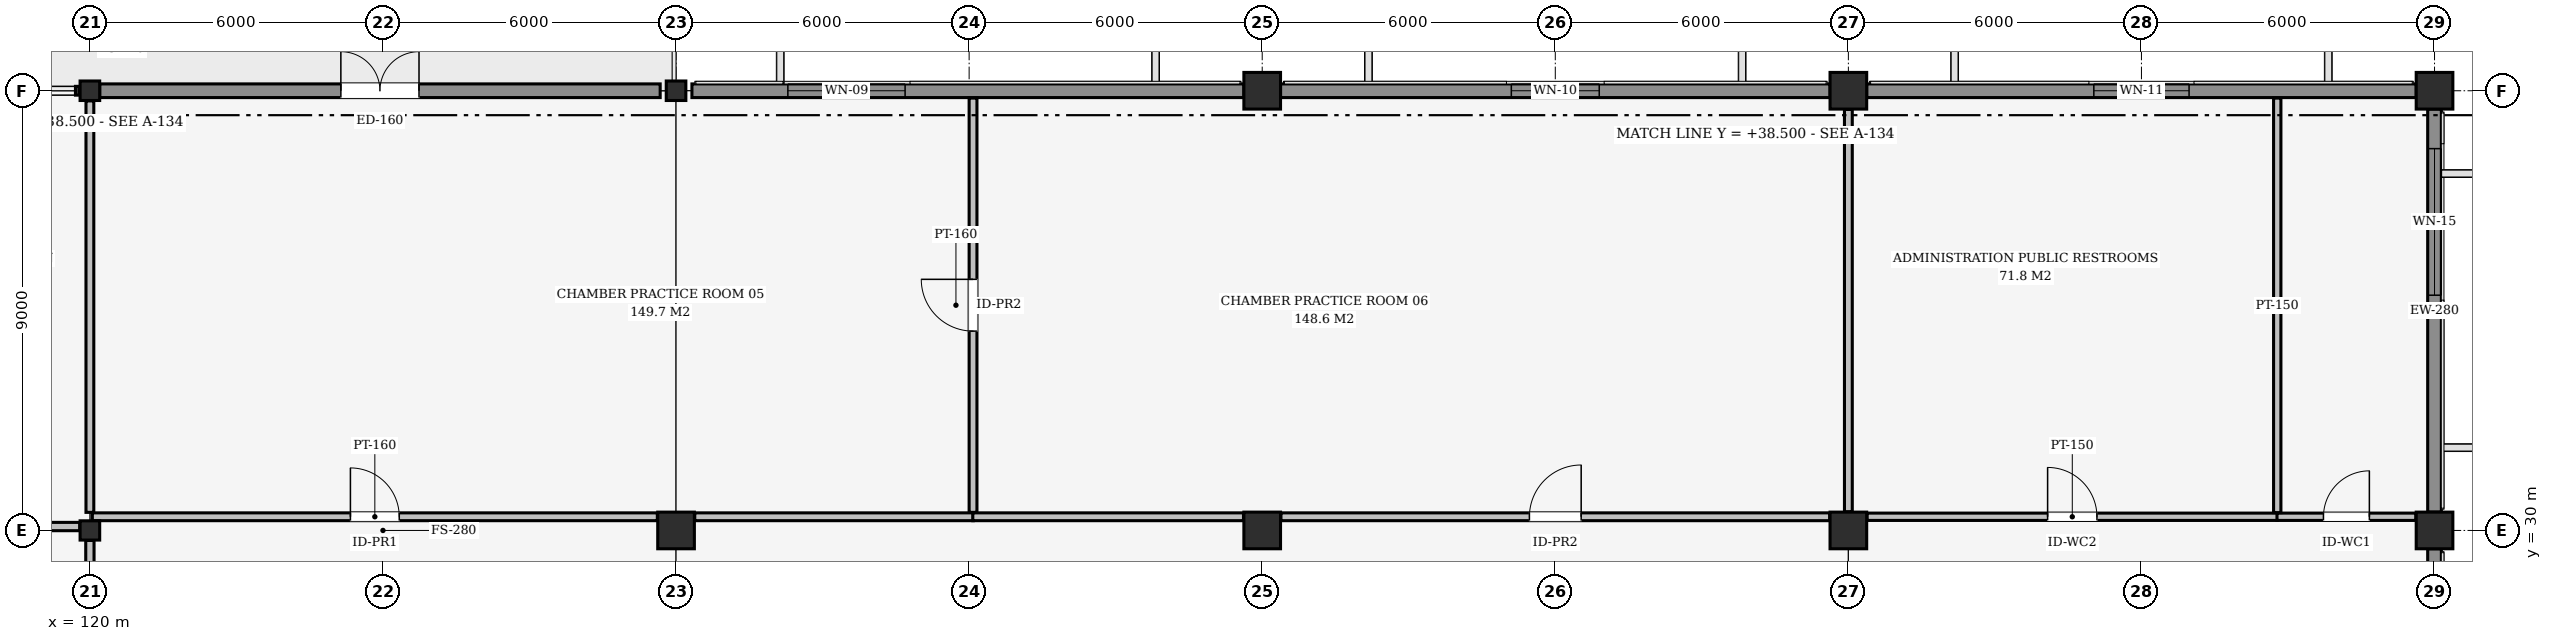
"""IFC4 building model, lengths in metres.
Left out: names, types, materials, properties, quantities, classifications, styles, units other than length and angle.
Written with IfcOpenShell. Run it as: python <this file> out.ifc"""

import sys

from ifc_helpers import new_model, si_unit, direction, frame, frame_2d, origin, origin_2d, place, context, subcontext, project, spatial, rectangle, i_section, extrude, element, fill, save


model = new_model("IFC4")
c1 = context("Model", 3, precision=1e-05, world=origin(), true_north=direction((0.0, 1.0)))
c2 = subcontext(c1, "Body", "Model", "MODEL_VIEW")
j1 = project(units=[si_unit("LENGTHUNIT", "METRE"), si_unit("PLANEANGLEUNIT", "RADIAN")], contexts=[c1])
p1 = place(None, origin())
s1 = spatial("IfcSite", under=j1, at=p1, CompositionType="ELEMENT")
p2 = place(p1, origin())
s2 = spatial("IfcBuilding", under=s1, at=p2, CompositionType="ELEMENT")
p3 = place(p2, frame((0.0, 0.0, 9.3)))
s3 = spatial("IfcBuildingStorey", under=s2, at=p3, CompositionType="ELEMENT", Elevation=9.3)
p4 = place(p3, frame((120.0, 30.0, 0.0), z_axis=(0.0, 0.0, 1.0), x_axis=(1.0, 0.0, 0.0)))
e1 = element("IfcColumn", 1, at=p4, inside=s3, PredefinedType="COLUMN", context=c2, shape_type="SweptSolid", body=[
    extrude(i_section(OverallWidth=0.401, OverallDepth=0.394, WebThickness=0.023, FlangeThickness=0.037, at=origin_2d()), origin(), (0.0, 0.0, 1.0), 4.5),
])
p5 = place(p3, frame((120.0, 39.0, 0.0), z_axis=(0.0, 0.0, 1.0), x_axis=(1.0, 0.0, 0.0)))
e2 = element("IfcColumn", 2, at=p5, inside=s3, PredefinedType="COLUMN", context=c2, shape_type="SweptSolid", body=[
    extrude(i_section(OverallWidth=0.401, OverallDepth=0.399, WebThickness=0.025, FlangeThickness=0.04, at=origin_2d()), origin(), (0.0, 0.0, 1.0), 4.5),
])
p6 = place(p3, frame((132.0, 30.0, 0.0), z_axis=(0.0, 0.0, 1.0), x_axis=(1.0, 0.0, 0.0)))
e3 = element("IfcColumn", 3, at=p6, inside=s3, PredefinedType="COLUMN", context=c2, shape_type="SweptSolid", body=[
    extrude(rectangle(XDim=0.75, YDim=0.75, at=origin_2d()), origin(), (0.0, 0.0, 1.0), 4.5),
])
p7 = place(p3, frame((132.0, 39.0, 0.0), z_axis=(0.0, 0.0, 1.0), x_axis=(1.0, 0.0, 0.0)))
e4 = element("IfcColumn", 4, at=p7, inside=s3, PredefinedType="COLUMN", context=c2, shape_type="SweptSolid", body=[
    extrude(i_section(OverallWidth=0.401, OverallDepth=0.399, WebThickness=0.025, FlangeThickness=0.04, at=origin_2d()), origin(), (0.0, 0.0, 1.0), 4.5),
])
for number, where, z_axis, x_axis in (
    (5, (144.0, 30.0, 0.0), (0.0, 0.0, 1.0), (1.0, 0.0, 0.0)),
    (6, (144.0, 39.0, 0.0), (0.0, 0.0, 1.0), (1.0, 0.0, 0.0)),
    (7, (156.0, 30.0, 0.0), (0.0, 0.0, 1.0), (1.0, 0.0, 0.0)),
    (8, (156.0, 39.0, 0.0), (0.0, 0.0, 1.0), (1.0, 0.0, 0.0)),
    (9, (168.0, 30.0, 0.0), (0.0, 0.0, 1.0), (1.0, 0.0, 0.0)),
    (10, (168.0, 39.0, 0.0), (0.0, 0.0, 1.0), (1.0, 0.0, 0.0)),
):
    element("IfcColumn", number, at=place(p3, frame(where, z_axis=z_axis, x_axis=x_axis)), inside=s3, PredefinedType="COLUMN", context=c2, shape_type="SweptSolid", body=[
        extrude(rectangle(XDim=0.75, YDim=0.75, at=origin_2d()), origin(), (0.0, 0.0, 1.0), 4.5),
    ])
p8 = place(p3, frame((120.2, 39.0, 0.0), z_axis=(0.0, 0.0, 1.0), x_axis=(1.0, 0.0, 0.0)))
e11 = element("IfcWall", 11, at=p8, inside=s3, PredefinedType="SOLIDWALL", context=c2, shape_type="SweptSolid", body=[
    extrude(rectangle(XDim=11.475, YDim=0.28, at=frame_2d((5.737, 0.0))), origin(), (0.0, 0.0, 1.0), 3.388),
])
p9 = place(p8, frame((4.937, 0.0, 0.0)))
e12 = element("IfcOpeningElement", 12, at=p9, cuts=e11, PredefinedType="OPENING", context=c2, shape_type="SweptSolid", body=[
    extrude(rectangle(XDim=1.6, YDim=2.3, at=frame_2d((0.8, 1.15))), frame((0.0, 0.15, 0.0), z_axis=(0.0, -1.0, 0.0), x_axis=(1.0, 0.0, 0.0)), (0.0, 0.0, 1.0), 0.3),
])
p10 = place(p3, frame((132.325, 39.0, 0.0), z_axis=(0.0, 0.0, 1.0), x_axis=(1.0, 0.0, 0.0)))
e13 = element("IfcWall", 13, at=p10, inside=s3, PredefinedType="SOLIDWALL", context=c2, shape_type="SweptSolid", body=[
    extrude(rectangle(XDim=11.3, YDim=0.28, at=frame_2d((5.65, 0.0))), origin(), (0.0, 0.0, 1.0), 3.549),
])
p11 = place(p10, frame((1.964, 0.0, 0.85)))
e14 = element("IfcOpeningElement", 14, at=p11, cuts=e13, PredefinedType="OPENING", context=c2, shape_type="SweptSolid", body=[
    extrude(rectangle(XDim=2.4, YDim=0.95, at=frame_2d((1.2, 0.475))), frame((0.0, 0.15, 0.0), z_axis=(0.0, -1.0, 0.0), x_axis=(1.0, 0.0, 0.0)), (0.0, 0.0, 1.0), 0.3),
])
p12 = place(p3, frame((144.375, 39.0, 0.0), z_axis=(0.0, 0.0, 1.0), x_axis=(1.0, 0.0, 0.0)))
e15 = element("IfcWall", 15, at=p12, inside=s3, PredefinedType="SOLIDWALL", context=c2, shape_type="SweptSolid", body=[
    extrude(rectangle(XDim=11.25, YDim=0.28, at=frame_2d((5.625, 0.0))), origin(), (0.0, 0.0, 1.0), 3.549),
])
p13 = place(p12, frame((4.725, 0.0, 0.85)))
e16 = element("IfcOpeningElement", 16, at=p13, cuts=e15, PredefinedType="OPENING", context=c2, shape_type="SweptSolid", body=[
    extrude(rectangle(XDim=1.8, YDim=0.95, at=frame_2d((0.9, 0.475))), frame((0.0, 0.15, 0.0), z_axis=(0.0, -1.0, 0.0), x_axis=(1.0, 0.0, 0.0)), (0.0, 0.0, 1.0), 0.3),
])
p14 = place(p3, frame((156.375, 39.0, 0.0), z_axis=(0.0, 0.0, 1.0), x_axis=(1.0, 0.0, 0.0)))
e17 = element("IfcWall", 17, at=p14, inside=s3, PredefinedType="SOLIDWALL", context=c2, shape_type="SweptSolid", body=[
    extrude(rectangle(XDim=11.25, YDim=0.28, at=frame_2d((5.625, 0.0))), origin(), (0.0, 0.0, 1.0), 3.549),
])
p15 = place(p14, frame((4.65, 0.0, 0.85)))
e18 = element("IfcOpeningElement", 18, at=p15, cuts=e17, PredefinedType="OPENING", context=c2, shape_type="SweptSolid", body=[
    extrude(rectangle(XDim=1.95, YDim=1.75, at=frame_2d((0.975, 0.875))), frame((0.0, 0.15, 0.0), z_axis=(0.0, -1.0, 0.0), x_axis=(1.0, 0.0, 0.0)), (0.0, 0.0, 1.0), 0.3),
])
p16 = place(p3, frame((168.0, 29.625, 0.0), z_axis=(0.0, 0.0, 1.0), x_axis=(0.0, -1.0, 0.0)))
e19 = element("IfcWall", 19, at=p16, inside=s3, PredefinedType="SOLIDWALL", context=c2, shape_type="SweptSolid", body=[
    extrude(rectangle(XDim=5.25, YDim=0.28, at=frame_2d((2.625, 0.0))), origin(), (0.0, 0.0, 1.0), 3.548),
])
p17 = place(p16, frame((2.075, 0.0, 0.6)))
e20 = element("IfcOpeningElement", 20, at=p17, cuts=e19, PredefinedType="OPENING", context=c2, shape_type="SweptSolid", body=[
    extrude(rectangle(XDim=1.1, YDim=2.4, at=frame_2d((0.55, 1.2))), frame((0.0, 0.15, 0.0), z_axis=(0.0, -1.0, 0.0), x_axis=(1.0, 0.0, 0.0)), (0.0, 0.0, 1.0), 0.3),
])
p18 = place(p3, frame((168.0, 38.625, 0.0), z_axis=(0.0, 0.0, 1.0), x_axis=(0.0, -1.0, 0.0)))
e21 = element("IfcWall", 21, at=p18, inside=s3, PredefinedType="SOLIDWALL", context=c2, shape_type="SweptSolid", body=[
    extrude(rectangle(XDim=8.25, YDim=0.28, at=frame_2d((4.125, 0.0))), origin(), (0.0, 0.0, 1.0), 3.549),
])
p19 = place(p18, frame((0.81, 0.0, 0.6)))
e22 = element("IfcOpeningElement", 22, at=p19, cuts=e21, PredefinedType="OPENING", context=c2, shape_type="SweptSolid", body=[
    extrude(rectangle(XDim=3.0, YDim=2.1, at=frame_2d((1.5, 1.05))), frame((0.0, 0.15, 0.0), z_axis=(0.0, -1.0, 0.0), x_axis=(1.0, 0.0, 0.0)), (0.0, 0.0, 1.0), 0.3),
])
p20 = place(p3, frame((120.05, 30.28, 0.0), z_axis=(0.0, 0.0, 1.0), x_axis=(1.0, 0.0, 0.0)))
e23 = element("IfcWall", 23, at=p20, inside=s3, PredefinedType="PARTITIONING", context=c2, shape_type="SweptSolid", body=[
    extrude(rectangle(XDim=11.567, YDim=0.16, at=frame_2d((5.783, 0.0))), origin(), (0.0, 0.0, 1.0), 3.388),
])
p21 = place(p20, frame((5.283, 0.0, 0.0)))
e24 = element("IfcOpeningElement", 24, at=p21, cuts=e23, PredefinedType="OPENING", context=c2, shape_type="SweptSolid", body=[
    extrude(rectangle(XDim=1.0, YDim=2.16, at=frame_2d((0.5, 1.08))), frame((0.0, 0.09, 0.0), z_axis=(0.0, -1.0, 0.0), x_axis=(1.0, 0.0, 0.0)), (0.0, 0.0, 1.0), 0.18),
])
p22 = place(p3, frame((132.383, 30.28, 0.0), z_axis=(0.0, 0.0, 1.0), x_axis=(1.0, 0.0, 0.0)))
e25 = element("IfcWall", 25, at=p22, inside=s3, PredefinedType="PARTITIONING", context=c2, shape_type="SweptSolid", body=[
    extrude(rectangle(XDim=5.702, YDim=0.16, at=frame_2d((2.851, 0.0))), origin(), (0.0, 0.0, 1.0), 3.549),
])
p23 = place(p3, frame((138.075, 30.28, 0.0), z_axis=(0.0, 0.0, 1.0), x_axis=(1.0, 0.0, 0.0)))
e26 = element("IfcWall", 26, at=p23, inside=s3, PredefinedType="PARTITIONING", context=c2, shape_type="SweptSolid", body=[
    extrude(rectangle(XDim=5.542, YDim=0.16, at=frame_2d((2.771, 0.0))), origin(), (0.0, 0.0, 1.0), 3.549),
])
p24 = place(p3, frame((144.383, 30.28, 0.0), z_axis=(0.0, 0.0, 1.0), x_axis=(1.0, 0.0, 0.0)))
e27 = element("IfcWall", 27, at=p24, inside=s3, PredefinedType="PARTITIONING", context=c2, shape_type="SweptSolid", body=[
    extrude(rectangle(XDim=11.234, YDim=0.16, at=frame_2d((5.617, 0.0))), origin(), (0.0, 0.0, 1.0), 3.549),
])
p25 = place(p24, frame((5.087, 0.0, 0.0)))
e28 = element("IfcOpeningElement", 28, at=p25, cuts=e27, PredefinedType="OPENING", context=c2, shape_type="SweptSolid", body=[
    extrude(rectangle(XDim=1.06, YDim=2.22, at=frame_2d((0.53, 1.11))), frame((0.0, 0.09, 0.0), z_axis=(0.0, -1.0, 0.0), x_axis=(1.0, 0.0, 0.0)), (0.0, 0.0, 1.0), 0.18),
])
p26 = place(p3, frame((156.383, 30.28, 0.0), z_axis=(0.0, 0.0, 1.0), x_axis=(1.0, 0.0, 0.0)))
e29 = element("IfcWall", 29, at=p26, inside=s3, PredefinedType="PARTITIONING", context=c2, shape_type="SweptSolid", body=[
    extrude(rectangle(XDim=8.402, YDim=0.15, at=frame_2d((4.201, 0.0))), origin(), (0.0, 0.0, 1.0), 3.549),
])
p27 = place(p26, frame((3.696, 0.0, 0.0)))
e30 = element("IfcOpeningElement", 30, at=p27, cuts=e29, PredefinedType="OPENING", context=c2, shape_type="SweptSolid", body=[
    extrude(rectangle(XDim=1.01, YDim=2.1, at=frame_2d((0.505, 1.05))), frame((0.0, 0.085, 0.0), z_axis=(0.0, -1.0, 0.0), x_axis=(1.0, 0.0, 0.0)), (0.0, 0.0, 1.0), 0.17),
])
p28 = place(p3, frame((164.775, 30.28, 0.0), z_axis=(0.0, 0.0, 1.0), x_axis=(1.0, 0.0, 0.0)))
e31 = element("IfcWall", 31, at=p28, inside=s3, PredefinedType="PARTITIONING", context=c2, shape_type="SweptSolid", body=[
    extrude(rectangle(XDim=2.842, YDim=0.15, at=frame_2d((1.421, 0.0))), origin(), (0.0, 0.0, 1.0), 3.549),
])
p29 = place(p28, frame((0.951, 0.0, 0.0)))
e32 = element("IfcOpeningElement", 32, at=p29, cuts=e31, PredefinedType="OPENING", context=c2, shape_type="SweptSolid", body=[
    extrude(rectangle(XDim=0.94, YDim=2.1, at=frame_2d((0.47, 1.05))), frame((0.0, 0.085, 0.0), z_axis=(0.0, -1.0, 0.0), x_axis=(1.0, 0.0, 0.0)), (0.0, 0.0, 1.0), 0.17),
])
p30 = place(p3, frame((120.0, 24.205, 0.0), z_axis=(0.0, 0.0, 1.0), x_axis=(0.0, 1.0, 0.0)))
e33 = element("IfcWall", 33, at=p30, inside=s3, PredefinedType="PARTITIONING", context=c2, shape_type="SweptSolid", body=[
    extrude(rectangle(XDim=5.59, YDim=0.17, at=frame_2d((2.795, 0.0))), origin(), (0.0, 0.0, 1.0), 3.764),
])
p31 = place(p30, frame((2.185, 0.0, 0.0)))
e34 = element("IfcOpeningElement", 34, at=p31, cuts=e33, PredefinedType="OPENING", context=c2, shape_type="SweptSolid", body=[
    extrude(rectangle(XDim=1.22, YDim=2.18, at=frame_2d((0.61, 1.09))), frame((0.0, 0.095, 0.0), z_axis=(0.0, -1.0, 0.0), x_axis=(1.0, 0.0, 0.0)), (0.0, 0.0, 1.0), 0.19),
])
p32 = place(p3, frame((138.08, 30.37, 0.0), z_axis=(0.0, 0.0, 1.0), x_axis=(0.0, 1.0, 0.0)))
e35 = element("IfcWall", 35, at=p32, inside=s3, PredefinedType="PARTITIONING", context=c2, shape_type="SweptSolid", body=[
    extrude(rectangle(XDim=8.48, YDim=0.16, at=frame_2d((4.24, 0.0))), origin(), (0.0, 0.0, 1.0), 3.703),
])
p33 = place(p32, frame((3.71, 0.0, 0.0)))
e36 = element("IfcOpeningElement", 36, at=p33, cuts=e35, PredefinedType="OPENING", context=c2, shape_type="SweptSolid", body=[
    extrude(rectangle(XDim=1.06, YDim=2.22, at=frame_2d((0.53, 1.11))), frame((0.0, 0.09, 0.0), z_axis=(0.0, -1.0, 0.0), x_axis=(1.0, 0.0, 0.0)), (0.0, 0.0, 1.0), 0.18),
])
p34 = place(p3, frame((120.0, 30.37, 0.0), z_axis=(0.0, 0.0, 1.0), x_axis=(0.0, 1.0, 0.0)))
e37 = element("IfcWall", 37, at=p34, inside=s3, PredefinedType="PARTITIONING", context=c2, shape_type="SweptSolid", body=[
    extrude(rectangle(XDim=8.422, YDim=0.16, at=frame_2d((4.211, 0.0))), origin(), (0.0, 0.0, 1.0), 3.764),
])
p35 = place(p3, frame((156.0, 30.383, 0.0), z_axis=(0.0, 0.0, 1.0), x_axis=(0.0, 1.0, 0.0)))
e38 = element("IfcWall", 38, at=p35, inside=s3, PredefinedType="PARTITIONING", context=c2, shape_type="SweptSolid", body=[
    extrude(rectangle(XDim=8.234, YDim=0.16, at=frame_2d((4.117, 0.0))), origin(), (0.0, 0.0, 1.0), 3.549),
])
p36 = place(p3, frame((164.78, 30.365, 0.0), z_axis=(0.0, 0.0, 1.0), x_axis=(0.0, 1.0, 0.0)))
e39 = element("IfcWall", 39, at=p36, inside=s3, PredefinedType="PARTITIONING", context=c2, shape_type="SweptSolid", body=[
    extrude(rectangle(XDim=8.485, YDim=0.15, at=frame_2d((4.243, 0.0))), origin(), (0.0, 0.0, 1.0), 3.703),
])
p37 = place(p3, frame((108.206, 30.08, 0.0), z_axis=(0.0, 0.0, 1.0), x_axis=(1.0, 0.0, 0.0)))
e40 = element("IfcWall", 40, at=p37, inside=s3, PredefinedType="PARTITIONING", context=c2, shape_type="SweptSolid", body=[
    extrude(rectangle(XDim=11.585, YDim=0.17, at=frame_2d((5.793, 0.0))), origin(), (0.0, 0.0, 1.0), 3.739),
])
p38 = place(p37, frame((5.113, 0.0, 0.0)))
e41 = element("IfcOpeningElement", 41, at=p38, cuts=e40, PredefinedType="OPENING", context=c2, shape_type="SweptSolid", body=[
    extrude(rectangle(XDim=1.36, YDim=2.2, at=frame_2d((0.68, 1.1))), frame((0.0, 0.095, 0.0), z_axis=(0.0, -1.0, 0.0), x_axis=(1.0, 0.0, 0.0)), (0.0, 0.0, 1.0), 0.19),
])
p39 = place(p9, origin())
e42 = element("IfcDoor", 42, at=p39, inside=s3, OperationType="DOUBLE_DOOR_SINGLE_SWING", PredefinedType="DOOR", context=c2, shape_type="SweptSolid", body=[
    extrude(rectangle(XDim=1.6, YDim=2.3, at=frame_2d((0.8, 1.15))), frame((0.0, 0.025, 0.0), z_axis=(0.0, -1.0, 0.0), x_axis=(1.0, 0.0, 0.0)), (0.0, 0.0, 1.0), 0.05),
])
fill(e12, e42)
p40 = place(p11, origin())
e43 = element("IfcWindow", 43, at=p40, inside=s3, PartitioningType="SINGLE_PANEL", PredefinedType="WINDOW", context=c2, shape_type="SweptSolid", body=[
    extrude(rectangle(XDim=2.4, YDim=0.95, at=frame_2d((1.2, 0.475))), frame((0.0, 0.03, 0.0), z_axis=(0.0, -1.0, 0.0), x_axis=(1.0, 0.0, 0.0)), (0.0, 0.0, 1.0), 0.06),
])
fill(e14, e43)
p41 = place(p13, origin())
e44 = element("IfcWindow", 44, at=p41, inside=s3, PartitioningType="SINGLE_PANEL", PredefinedType="WINDOW", context=c2, shape_type="SweptSolid", body=[
    extrude(rectangle(XDim=1.8, YDim=0.95, at=frame_2d((0.9, 0.475))), frame((0.0, 0.03, 0.0), z_axis=(0.0, -1.0, 0.0), x_axis=(1.0, 0.0, 0.0)), (0.0, 0.0, 1.0), 0.06),
])
fill(e16, e44)
p42 = place(p15, origin())
e45 = element("IfcWindow", 45, at=p42, inside=s3, PartitioningType="SINGLE_PANEL", PredefinedType="WINDOW", context=c2, shape_type="SweptSolid", body=[
    extrude(rectangle(XDim=1.95, YDim=1.75, at=frame_2d((0.975, 0.875))), frame((0.0, 0.03, 0.0), z_axis=(0.0, -1.0, 0.0), x_axis=(1.0, 0.0, 0.0)), (0.0, 0.0, 1.0), 0.06),
])
fill(e18, e45)
p43 = place(p19, origin())
e46 = element("IfcWindow", 46, at=p43, inside=s3, PartitioningType="SINGLE_PANEL", PredefinedType="WINDOW", context=c2, shape_type="SweptSolid", body=[
    extrude(rectangle(XDim=3.0, YDim=2.1, at=frame_2d((1.5, 1.05))), frame((0.0, 0.03, 0.0), z_axis=(0.0, -1.0, 0.0), x_axis=(1.0, 0.0, 0.0)), (0.0, 0.0, 1.0), 0.06),
])
fill(e22, e46)
p44 = place(p21, origin())
e47 = element("IfcDoor", 47, at=p44, inside=s3, OperationType="SINGLE_SWING_LEFT", PredefinedType="DOOR", context=c2, shape_type="SweptSolid", body=[
    extrude(rectangle(XDim=1.0, YDim=2.16, at=frame_2d((0.5, 1.08))), frame((0.0, 0.025, 0.0), z_axis=(0.0, -1.0, 0.0), x_axis=(1.0, 0.0, 0.0)), (0.0, 0.0, 1.0), 0.05),
])
fill(e24, e47)
p45 = place(p25, origin())
e48 = element("IfcDoor", 48, at=p45, inside=s3, OperationType="SINGLE_SWING_RIGHT", PredefinedType="DOOR", context=c2, shape_type="SweptSolid", body=[
    extrude(rectangle(XDim=1.06, YDim=2.22, at=frame_2d((0.53, 1.11))), frame((0.0, 0.025, 0.0), z_axis=(0.0, -1.0, 0.0), x_axis=(1.0, 0.0, 0.0)), (0.0, 0.0, 1.0), 0.05),
])
fill(e28, e48)
p46 = place(p27, origin())
e49 = element("IfcDoor", 49, at=p46, inside=s3, OperationType="SINGLE_SWING_LEFT", PredefinedType="DOOR", context=c2, shape_type="SweptSolid", body=[
    extrude(rectangle(XDim=1.01, YDim=2.1, at=frame_2d((0.505, 1.05))), frame((0.0, 0.025, 0.0), z_axis=(0.0, -1.0, 0.0), x_axis=(1.0, 0.0, 0.0)), (0.0, 0.0, 1.0), 0.05),
])
fill(e30, e49)
p47 = place(p29, origin())
e50 = element("IfcDoor", 50, at=p47, inside=s3, OperationType="SINGLE_SWING_RIGHT", PredefinedType="DOOR", context=c2, shape_type="SweptSolid", body=[
    extrude(rectangle(XDim=0.94, YDim=2.1, at=frame_2d((0.47, 1.05))), frame((0.0, 0.025, 0.0), z_axis=(0.0, -1.0, 0.0), x_axis=(1.0, 0.0, 0.0)), (0.0, 0.0, 1.0), 0.05),
])
fill(e32, e50)
p48 = place(p33, origin())
e51 = element("IfcDoor", 51, at=p48, inside=s3, OperationType="SINGLE_SWING_RIGHT", PredefinedType="DOOR", context=c2, shape_type="SweptSolid", body=[
    extrude(rectangle(XDim=1.06, YDim=2.22, at=frame_2d((0.53, 1.11))), frame((0.0, 0.025, 0.0), z_axis=(0.0, -1.0, 0.0), x_axis=(1.0, 0.0, 0.0)), (0.0, 0.0, 1.0), 0.05),
])
fill(e36, e51)
save(model, sys.argv[1])
